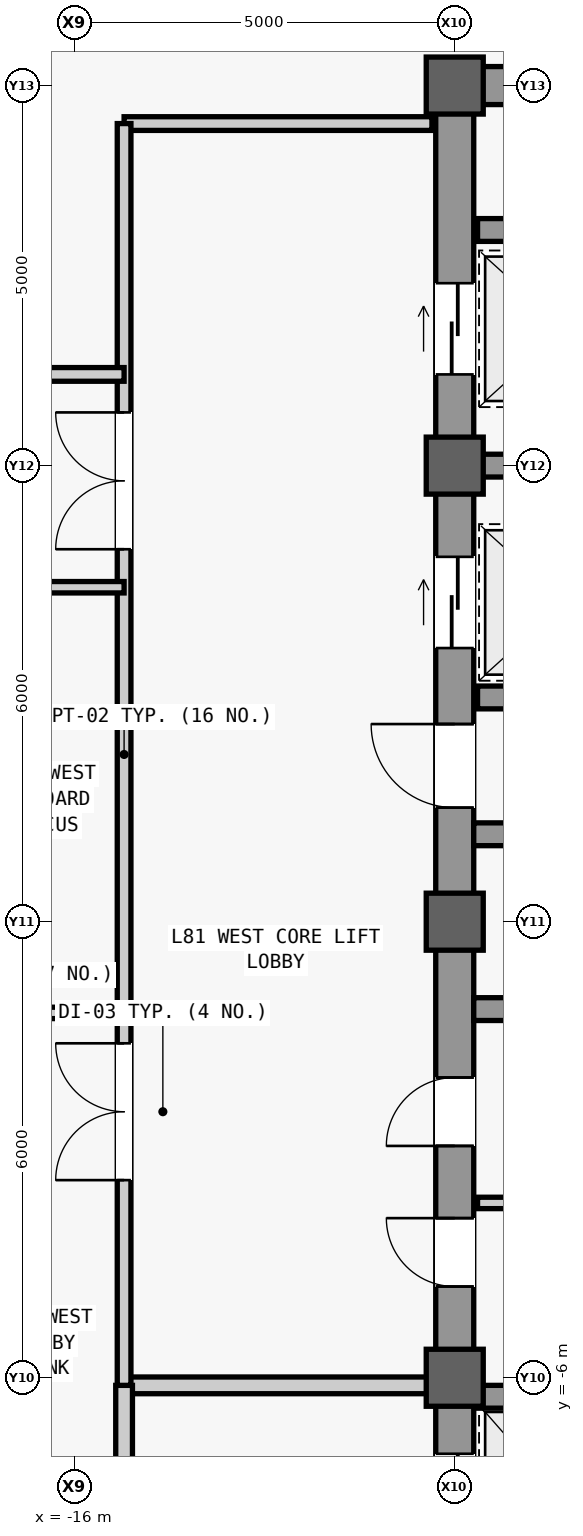
"""IFC4 building model, lengths in metres.
Left out: names, types, materials, properties, quantities, classifications, styles, units other than length and angle.
Written with IfcOpenShell. Run it as: python <this file> out.ifc"""

import sys

from ifc_helpers import new_model, si_unit, direction, frame, frame_2d, origin, origin_2d, place, context, subcontext, project, spatial, rectangle, extrude, source, transform, mapped, element, fill, save


model = new_model("IFC4")
c1 = context("Model", 3, precision=1e-05, world=origin(), true_north=direction((0.0, 1.0)))
c2 = subcontext(c1, "Body", "Model", "MODEL_VIEW")
j1 = project(units=[si_unit("LENGTHUNIT", "METRE"), si_unit("PLANEANGLEUNIT", "RADIAN")], contexts=[c1])
p1 = place(None, origin())
s1 = spatial("IfcSite", under=j1, at=p1, CompositionType="ELEMENT")
p2 = place(p1, origin())
s2 = spatial("IfcBuilding", under=s1, at=p2, CompositionType="ELEMENT")
p3 = place(p2, frame((0.0, 0.0, 342.3)))
s3 = spatial("IfcBuildingStorey", under=s2, at=p3, CompositionType="ELEMENT", Elevation=342.3)
m1 = source(origin(), c2, "Body", "SweptSolid", [
    extrude(rectangle(XDim=22.0, YDim=0.5, at=frame_2d((11.0, 0.0))), origin(), (0.0, 0.0, 1.0), 3.7),
])
p4 = place(p3, frame((-11.0, -11.0, 0.0), z_axis=(0.0, 0.0, 1.0), x_axis=(0.0, 1.0, 0.0)))
e1 = element("IfcWall", 1, at=p4, inside=s3, PredefinedType="SHEAR", context=c2, shape_type="MappedRepresentation", body=[
    mapped(m1, transform((0.0, 0.0, 0.0), scale=1.0)),
])
m2 = source(origin(), c2, "Body", "SweptSolid", [
    extrude(rectangle(XDim=1.1, YDim=2.2, at=frame_2d((0.55, 1.1))), frame((0.0, 0.26, 0.0), z_axis=(0.0, -1.0, 0.0), x_axis=(1.0, 0.0, 0.0)), (0.0, 0.0, 1.0), 0.52),
])
p5 = place(p4, frame((0.8, 0.0, 0.0)))
e2 = element("IfcOpeningElement", 2, at=p5, cuts=e1, PredefinedType="OPENING", context=c2, shape_type="MappedRepresentation", body=[
    mapped(m2, transform((0.0, 0.0, 0.0), scale=1.0)),
])
p6 = place(p4, frame((12.5, 0.0, 0.0)))
e3 = element("IfcOpeningElement", 3, at=p6, cuts=e1, PredefinedType="OPENING", context=c2, shape_type="MappedRepresentation", body=[
    mapped(m2, transform((0.0, 0.0, 0.0), scale=1.0)),
])
m3 = source(origin(), c2, "Body", "SweptSolid", [
    extrude(rectangle(XDim=0.9, YDim=2.15, at=frame_2d((0.45, 1.075))), frame((0.0, 0.26, 0.0), z_axis=(0.0, -1.0, 0.0), x_axis=(1.0, 0.0, 0.0)), (0.0, 0.0, 1.0), 0.52),
])
p7 = place(p4, frame((6.2, 0.0, 0.0)))
e4 = element("IfcOpeningElement", 4, at=p7, cuts=e1, PredefinedType="OPENING", context=c2, shape_type="MappedRepresentation", body=[
    mapped(m3, transform((0.0, 0.0, 0.0), scale=1.0)),
])
p8 = place(p4, frame((8.05, 0.0, 0.0)))
e5 = element("IfcOpeningElement", 5, at=p8, cuts=e1, PredefinedType="OPENING", context=c2, shape_type="MappedRepresentation", body=[
    mapped(m3, transform((0.0, 0.0, 0.0), scale=1.0)),
])
m4 = source(origin(), c2, "Body", "SweptSolid", [
    extrude(rectangle(XDim=1.2, YDim=2.3, at=frame_2d((0.6, 1.15))), frame((0.0, 0.26, 0.0), z_axis=(0.0, -1.0, 0.0), x_axis=(1.0, 0.0, 0.0)), (0.0, 0.0, 1.0), 0.52),
])
p9 = place(p4, frame((14.6, 0.0, 0.0)))
e6 = element("IfcOpeningElement", 6, at=p9, cuts=e1, PredefinedType="OPENING", context=c2, shape_type="MappedRepresentation", body=[
    mapped(m4, transform((0.0, 0.0, 0.0), scale=1.0)),
])
p10 = place(p4, frame((18.2, 0.0, 0.0)))
e7 = element("IfcOpeningElement", 7, at=p10, cuts=e1, PredefinedType="OPENING", context=c2, shape_type="MappedRepresentation", body=[
    mapped(m4, transform((0.0, 0.0, 0.0), scale=1.0)),
])
m5 = source(origin(), c2, "Body", "SweptSolid", [
    extrude(rectangle(XDim=1.3, YDim=2.3, at=frame_2d((0.65, 1.15))), frame((0.0, 0.26, 0.0), z_axis=(0.0, -1.0, 0.0), x_axis=(1.0, 0.0, 0.0)), (0.0, 0.0, 1.0), 0.52),
])
p11 = place(p4, frame((2.7, 0.0, 0.0)))
e8 = element("IfcOpeningElement", 8, at=p11, cuts=e1, PredefinedType="OPENING", context=c2, shape_type="MappedRepresentation", body=[
    mapped(m5, transform((0.0, 0.0, 0.0), scale=1.0)),
])
m6 = source(origin(), c2, "Body", "SweptSolid", [
    extrude(rectangle(XDim=5.9, YDim=0.5, at=frame_2d((2.95, 0.0))), origin(), (0.0, 0.0, 1.0), 3.7),
])
p12 = place(p3, frame((-10.75, 11.0, 0.0), z_axis=(0.0, 0.0, 1.0), x_axis=(1.0, 0.0, 0.0)))
e9 = element("IfcWall", 9, at=p12, inside=s3, PredefinedType="SHEAR", context=c2, shape_type="MappedRepresentation", body=[
    mapped(m6, transform((0.0, 0.0, 0.0), scale=1.0)),
])
m7 = source(origin(), c2, "Body", "SweptSolid", [
    extrude(rectangle(XDim=5.65, YDim=0.3, at=frame_2d((2.825, 0.0))), origin(), (0.0, 0.0, 1.0), 3.7),
])
for number, where, z_axis, x_axis in (
    (10, (-10.75, -1.15, 0.0), (0.0, 0.0, 1.0), (1.0, 0.0, 0.0)),
    (11, (-10.75, 1.15, 0.0), (0.0, 0.0, 1.0), (1.0, 0.0, 0.0)),
):
    element("IfcWall", number, at=place(p3, frame(where, z_axis=z_axis, x_axis=x_axis)), inside=s3, PredefinedType="SHEAR", context=c2, shape_type="MappedRepresentation", body=[
        mapped(m7, transform((0.0, 0.0, 0.0), scale=1.0)),
    ])
m8 = source(origin(), c2, "Body", "SweptSolid", [
    extrude(rectangle(XDim=0.75, YDim=0.75, at=origin_2d()), origin(), (0.0, 0.0, 1.0), 4.0),
])
for number, where, z_axis, x_axis in (
    (12, (-11.0, -6.0, 0.0), (0.0, 0.0, 1.0), (1.0, 0.0, 0.0)),
    (13, (-11.0, 0.0, 0.0), (0.0, 0.0, 1.0), (1.0, 0.0, 0.0)),
    (14, (-11.0, 6.0, 0.0), (0.0, 0.0, 1.0), (1.0, 0.0, 0.0)),
    (15, (-11.0, 11.0, 0.0), (0.0, 0.0, 1.0), (1.0, 0.0, 0.0)),
):
    element("IfcColumn", number, at=place(p3, frame(where, z_axis=z_axis, x_axis=x_axis)), inside=s3, PredefinedType="COLUMN", context=c2, shape_type="MappedRepresentation", body=[
        mapped(m8, transform((0.0, 0.0, 0.0), scale=1.0)),
    ])
m9 = source(origin(), c2, "Body", "SweptSolid", [
    extrude(rectangle(XDim=2.2, YDim=0.3, at=frame_2d((1.1, 0.0))), origin(), (0.0, 0.0, 1.0), 3.7),
])
for number, where, z_axis, x_axis in (
    (16, (-10.7, -6.25, 0.0), (0.0, 0.0, 1.0), (1.0, 0.0, 0.0)),
    (17, (-10.7, 2.95, 0.0), (0.0, 0.0, 1.0), (1.0, 0.0, 0.0)),
    (18, (-10.7, 6.0, 0.0), (0.0, 0.0, 1.0), (1.0, 0.0, 0.0)),
    (19, (-10.7, 9.1, 0.0), (0.0, 0.0, 1.0), (1.0, 0.0, 0.0)),
):
    element("IfcWall", number, at=place(p3, frame(where, z_axis=z_axis, x_axis=x_axis)), inside=s3, PredefinedType="SHEAR", context=c2, shape_type="MappedRepresentation", body=[
        mapped(m9, transform((0.0, 0.0, 0.0), scale=1.0)),
    ])
m10 = source(origin(), c2, "Body", "SweptSolid", [
    extrude(rectangle(XDim=2.05, YDim=0.15, at=frame_2d((1.025, 0.0))), origin(), (0.0, 0.0, 1.0), 3.7),
])
p13 = place(p3, frame((-10.7, -3.7, 0.0), z_axis=(0.0, 0.0, 1.0), x_axis=(1.0, 0.0, 0.0)))
e20 = element("IfcWall", 20, at=p13, inside=s3, PredefinedType="PARTITIONING", context=c2, shape_type="MappedRepresentation", body=[
    mapped(m10, transform((0.0, 0.0, 0.0), scale=1.0)),
])
m11 = source(origin(), c2, "Body", "SweptSolid", [
    extrude(rectangle(XDim=4.05, YDim=0.22, at=frame_2d((2.025, 0.0))), origin(), (0.0, 0.0, 1.0), 3.084),
])
p14 = place(p3, frame((-15.35, -6.1, 0.0), z_axis=(0.0, 0.0, 1.0), x_axis=(1.0, 0.0, 0.0)))
e21 = element("IfcWall", 21, at=p14, inside=s3, PredefinedType="PARTITIONING", context=c2, shape_type="MappedRepresentation", body=[
    mapped(m11, transform((0.0, 0.0, 0.0), scale=1.0)),
])
m12 = source(origin(), c2, "Body", "SweptSolid", [
    extrude(rectangle(XDim=4.4, YDim=0.22, at=frame_2d((2.2, 0.0))), origin(), (0.0, 0.0, 1.0), 3.7),
])
p15 = place(p3, frame((-15.35, -10.5, 0.0), z_axis=(0.0, 0.0, 1.0), x_axis=(0.0, 1.0, 0.0)))
e22 = element("IfcWall", 22, at=p15, inside=s3, PredefinedType="PARTITIONING", context=c2, shape_type="MappedRepresentation", body=[
    mapped(m12, transform((0.0, 0.0, 0.0), scale=1.0)),
])
m13 = source(origin(), c2, "Body", "SweptSolid", [
    extrude(rectangle(XDim=1.2, YDim=2.2, at=frame_2d((0.6, 1.1))), frame((0.0, 0.12, 0.0), z_axis=(0.0, -1.0, 0.0), x_axis=(1.0, 0.0, 0.0)), (0.0, 0.0, 1.0), 0.24),
])
p16 = place(p15, frame((1.6, 0.0, 0.0)))
e23 = element("IfcOpeningElement", 23, at=p16, cuts=e22, PredefinedType="OPENING", context=c2, shape_type="MappedRepresentation", body=[
    mapped(m13, transform((0.0, 0.0, 0.0), scale=1.0)),
])
m14 = source(origin(), c2, "Body", "SweptSolid", [
    extrude(rectangle(XDim=4.05, YDim=0.18, at=frame_2d((2.025, 0.0))), origin(), (0.0, 0.0, 1.0), 3.7),
])
p17 = place(p3, frame((-15.35, 10.5, 0.0), z_axis=(0.0, 0.0, 1.0), x_axis=(1.0, 0.0, 0.0)))
e24 = element("IfcWall", 24, at=p17, inside=s3, PredefinedType="PARTITIONING", context=c2, shape_type="MappedRepresentation", body=[
    mapped(m14, transform((0.0, 0.0, 0.0), scale=1.0)),
])
m15 = source(origin(), c2, "Body", "SweptSolid", [
    extrude(rectangle(XDim=16.6, YDim=0.18, at=frame_2d((8.3, 0.0))), origin(), (0.0, 0.0, 1.0), 3.7),
])
p18 = place(p3, frame((-15.35, -6.1, 0.0), z_axis=(0.0, 0.0, 1.0), x_axis=(0.0, 1.0, 0.0)))
e25 = element("IfcWall", 25, at=p18, inside=s3, PredefinedType="PARTITIONING", context=c2, shape_type="MappedRepresentation", body=[
    mapped(m15, transform((0.0, 0.0, 0.0), scale=1.0)),
])
m16 = source(origin(), c2, "Body", "SweptSolid", [
    extrude(rectangle(XDim=1.8, YDim=2.25, at=frame_2d((0.9, 1.125))), frame((0.0, 0.1, 0.0), z_axis=(0.0, -1.0, 0.0), x_axis=(1.0, 0.0, 0.0)), (0.0, 0.0, 1.0), 0.2),
])
p19 = place(p18, frame((2.7, 0.0, 0.0)))
e26 = element("IfcOpeningElement", 26, at=p19, cuts=e25, PredefinedType="OPENING", context=c2, shape_type="MappedRepresentation", body=[
    mapped(m16, transform((0.0, 0.0, 0.0), scale=1.0)),
])
p20 = place(p18, frame((11.0, 0.0, 0.0)))
e27 = element("IfcOpeningElement", 27, at=p20, cuts=e25, PredefinedType="OPENING", context=c2, shape_type="MappedRepresentation", body=[
    mapped(m16, transform((0.0, 0.0, 0.0), scale=1.0)),
])
m17 = source(origin(), c2, "Body", "SweptSolid", [
    extrude(rectangle(XDim=2.05, YDim=0.15, at=frame_2d((1.025, 0.0))), origin(), (0.0, 0.0, 1.0), 3.7),
])
for number, where, z_axis, x_axis in (
    (28, (-17.4, -1.2, 0.0), (0.0, 0.0, 1.0), (1.0, 0.0, 0.0)),
    (29, (-17.4, 4.4, 0.0), (0.0, 0.0, 1.0), (1.0, 0.0, 0.0)),
):
    element("IfcWall", number, at=place(p3, frame(where, z_axis=z_axis, x_axis=x_axis)), inside=s3, PredefinedType="PARTITIONING", context=c2, shape_type="MappedRepresentation", body=[
        mapped(m17, transform((0.0, 0.0, 0.0), scale=1.0)),
    ])
m18 = source(origin(), c2, "Body", "SweptSolid", [
    extrude(rectangle(XDim=2.05, YDim=0.18, at=frame_2d((1.025, 0.0))), origin(), (0.0, 0.0, 1.0), 3.7),
])
p21 = place(p3, frame((-17.4, 7.2, 0.0), z_axis=(0.0, 0.0, 1.0), x_axis=(1.0, 0.0, 0.0)))
e30 = element("IfcWall", 30, at=p21, inside=s3, PredefinedType="PARTITIONING", context=c2, shape_type="MappedRepresentation", body=[
    mapped(m18, transform((0.0, 0.0, 0.0), scale=1.0)),
])
m19 = source(origin(), c2, "Body", "SweptSolid", [
    extrude(rectangle(XDim=1.1, YDim=2.2, at=frame_2d((0.55, 1.1))), frame((0.0, 0.025, 0.0), z_axis=(0.0, -1.0, 0.0), x_axis=(1.0, 0.0, 0.0)), (0.0, 0.0, 1.0), 0.05),
])
p22 = place(p6, origin())
e31 = element("IfcDoor", 31, at=p22, inside=s3, OperationType="SINGLE_SWING_RIGHT", PredefinedType="DOOR", context=c2, shape_type="MappedRepresentation", body=[
    mapped(m19, transform((0.0, 0.0, 0.0), scale=1.0)),
])
fill(e3, e31)
m20 = source(origin(), c2, "Body", "SweptSolid", [
    extrude(rectangle(XDim=0.9, YDim=2.15, at=frame_2d((0.45, 1.075))), frame((0.0, 0.025, 0.0), z_axis=(0.0, -1.0, 0.0), x_axis=(1.0, 0.0, 0.0)), (0.0, 0.0, 1.0), 0.05),
])
p23 = place(p7, origin())
e32 = element("IfcDoor", 32, at=p23, inside=s3, OperationType="SINGLE_SWING_RIGHT", PredefinedType="DOOR", context=c2, shape_type="MappedRepresentation", body=[
    mapped(m20, transform((0.0, 0.0, 0.0), scale=1.0)),
])
fill(e4, e32)
p24 = place(p8, origin())
e33 = element("IfcDoor", 33, at=p24, inside=s3, OperationType="SINGLE_SWING_LEFT", PredefinedType="DOOR", context=c2, shape_type="MappedRepresentation", body=[
    mapped(m20, transform((0.0, 0.0, 0.0), scale=1.0)),
])
fill(e5, e33)
m21 = source(origin(), c2, "Body", "SweptSolid", [
    extrude(rectangle(XDim=1.8, YDim=2.25, at=frame_2d((0.9, 1.125))), frame((0.0, 0.025, 0.0), z_axis=(0.0, -1.0, 0.0), x_axis=(1.0, 0.0, 0.0)), (0.0, 0.0, 1.0), 0.05),
])
p25 = place(p19, origin())
e34 = element("IfcDoor", 34, at=p25, inside=s3, OperationType="SINGLE_SWING_LEFT", PredefinedType="DOOR", context=c2, shape_type="MappedRepresentation", body=[
    mapped(m21, transform((0.0, 0.0, 0.0), scale=1.0)),
])
fill(e26, e34)
p26 = place(p20, origin())
e35 = element("IfcDoor", 35, at=p26, inside=s3, OperationType="SINGLE_SWING_RIGHT", PredefinedType="DOOR", context=c2, shape_type="MappedRepresentation", body=[
    mapped(m21, transform((0.0, 0.0, 0.0), scale=1.0)),
])
fill(e27, e35)
m22 = source(origin(), c2, "Body", "SweptSolid", [
    extrude(rectangle(XDim=1.2, YDim=2.3, at=frame_2d((0.6, 1.15))), frame((0.0, 0.025, 0.0), z_axis=(0.0, -1.0, 0.0), x_axis=(1.0, 0.0, 0.0)), (0.0, 0.0, 1.0), 0.05),
])
p27 = place(p9, origin())
e36 = element("IfcDoor", 36, at=p27, inside=s3, OperationType="SLIDING_TO_LEFT", PredefinedType="DOOR", context=c2, shape_type="MappedRepresentation", body=[
    mapped(m22, transform((0.0, 0.0, 0.0), scale=1.0)),
])
fill(e6, e36)
p28 = place(p10, origin())
e37 = element("IfcDoor", 37, at=p28, inside=s3, OperationType="SLIDING_TO_LEFT", PredefinedType="DOOR", context=c2, shape_type="MappedRepresentation", body=[
    mapped(m22, transform((0.0, 0.0, 0.0), scale=1.0)),
])
fill(e7, e37)
m23 = source(origin(), c2, "Body", "SweptSolid", [
    extrude(rectangle(XDim=1.3, YDim=2.3, at=frame_2d((0.65, 1.15))), frame((0.0, 0.025, 0.0), z_axis=(0.0, -1.0, 0.0), x_axis=(1.0, 0.0, 0.0)), (0.0, 0.0, 1.0), 0.05),
])
p29 = place(p11, origin())
e38 = element("IfcDoor", 38, at=p29, inside=s3, OperationType="SLIDING_TO_LEFT", PredefinedType="DOOR", context=c2, shape_type="MappedRepresentation", body=[
    mapped(m23, transform((0.0, 0.0, 0.0), scale=1.0)),
])
fill(e8, e38)
save(model, sys.argv[1])
